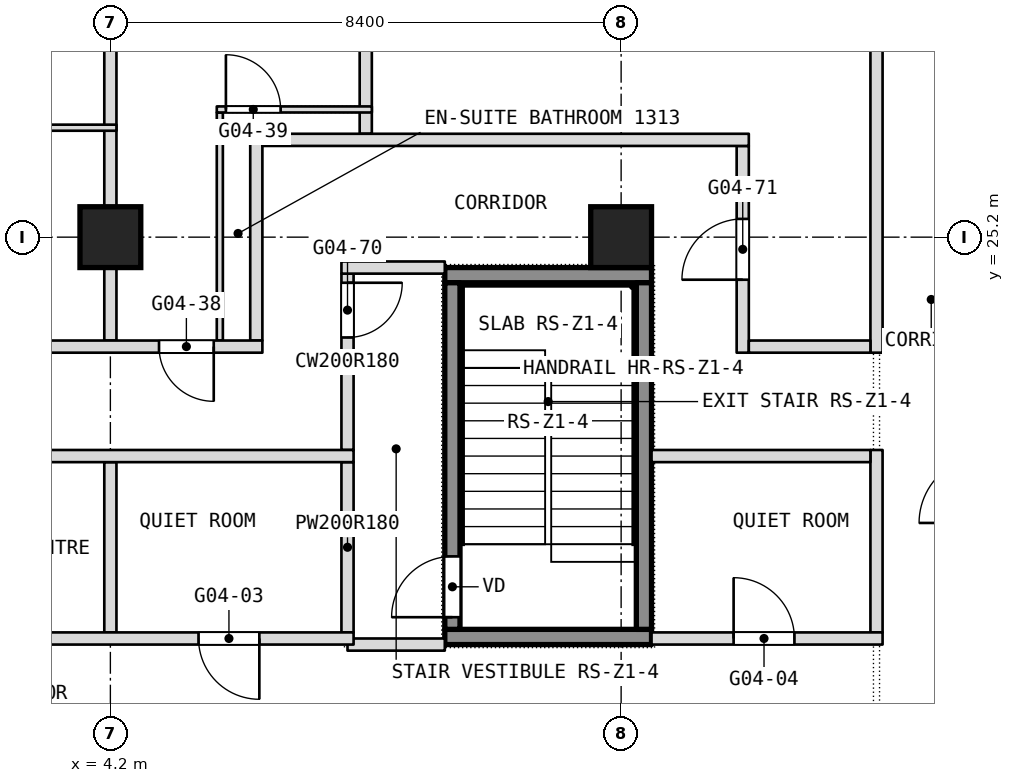
"""IFC4 building model, lengths in metres.
Left out: names, types, materials, properties, quantities, classifications, styles, units other than length and angle.
Written with IfcOpenShell. Run it as: python <this file> out.ifc"""

import sys

from ifc_helpers import new_model, si_unit, direction, frame, frame_2d, origin, origin_2d, place, context, subcontext, project, spatial, rectangle, extrude, element, fill, save


model = new_model("IFC4")
c1 = context("Model", 3, precision=1e-05, world=origin(), true_north=direction((0.0, 1.0)))
c2 = subcontext(c1, "Body", "Model", "MODEL_VIEW")
j1 = project(units=[si_unit("LENGTHUNIT", "METRE"), si_unit("PLANEANGLEUNIT", "RADIAN")], contexts=[c1])
p1 = place(None, origin())
s1 = spatial("IfcSite", under=j1, at=p1, CompositionType="ELEMENT")
p2 = place(p1, origin())
s2 = spatial("IfcBuilding", under=s1, at=p2, CompositionType="ELEMENT")
p3 = place(p2, frame((0.0, 0.0, 61.7)))
s3 = spatial("IfcBuildingStorey", under=s2, at=p3, CompositionType="ELEMENT", Elevation=61.7)
for number, where, z_axis, x_axis in (
    (1, (4.2, 25.2, 0.0), (0.0, 0.0, 1.0), (1.0, 0.0, 0.0)),
    (2, (12.6, 25.2, 0.0), (0.0, 0.0, 1.0), (1.0, 0.0, 0.0)),
):
    element("IfcColumn", number, at=place(p3, frame(where, z_axis=z_axis, x_axis=x_axis)), inside=s3, PredefinedType="COLUMN", context=c2, shape_type="SweptSolid", body=[
        extrude(rectangle(XDim=1.0, YDim=1.0, at=origin_2d()), origin(), (0.0, 0.0, 1.0), 3.6),
    ])
p4 = place(p3, frame((16.8, 18.7, 0.0), z_axis=(0.0, 0.0, 1.0), x_axis=(0.0, 1.0, 0.0)))
e3 = element("IfcWall", 3, at=p4, inside=s3, PredefinedType="PARTITIONING", context=c2, shape_type="SweptSolid", body=[
    extrude(rectangle(XDim=3.0, YDim=0.2, at=frame_2d((1.5, 0.0))), origin(), (0.0, 0.0, 1.0), 3.34),
])
p5 = place(p3, frame((16.8, 23.3, 0.0), z_axis=(0.0, 0.0, 1.0), x_axis=(0.0, 1.0, 0.0)))
e4 = element("IfcWall", 4, at=p5, inside=s3, PredefinedType="PARTITIONING", context=c2, shape_type="SweptSolid", body=[
    extrude(rectangle(XDim=10.24, YDim=0.2, at=frame_2d((5.12, 0.0))), origin(), (0.0, 0.0, 1.0), 3.34),
])
p6 = place(p3, frame((14.6, 23.3, 0.0), z_axis=(0.0, 0.0, 1.0), x_axis=(0.0, 1.0, 0.0)))
e5 = element("IfcWall", 5, at=p6, inside=s3, PredefinedType="PARTITIONING", context=c2, shape_type="SweptSolid", body=[
    extrude(rectangle(XDim=3.4, YDim=0.2, at=frame_2d((1.7, 0.0))), origin(), (0.0, 0.0, 1.0), 3.34),
])
p7 = place(p6, frame((1.2, 0.0, 0.0)))
e6 = element("IfcOpeningElement", 6, at=p7, cuts=e5, PredefinedType="OPENING", context=c2, shape_type="SweptSolid", body=[
    extrude(rectangle(XDim=1.0, YDim=2.1, at=frame_2d((0.5, 1.05))), frame((0.0, 0.1, 0.0), z_axis=(0.0, -1.0, 0.0), x_axis=(1.0, 0.0, 0.0)), (0.0, 0.0, 1.0), 0.2),
])
p8 = place(p3, frame((8.4, 26.9, 0.0), z_axis=(0.0, 0.0, 1.0), x_axis=(0.0, 1.0, 0.0)))
e7 = element("IfcWall", 7, at=p8, inside=s3, PredefinedType="PARTITIONING", context=c2, shape_type="SweptSolid", body=[
    extrude(rectangle(XDim=6.64, YDim=0.2, at=frame_2d((3.32, 0.0))), origin(), (0.0, 0.0, 1.0), 3.34),
])
p9 = place(p3, frame((8.1, 18.7, 0.0), z_axis=(0.0, 0.0, 1.0), x_axis=(0.0, 1.0, 0.0)))
e8 = element("IfcWall", 8, at=p9, inside=s3, PredefinedType="PARTITIONING", context=c2, shape_type="SweptSolid", body=[
    extrude(rectangle(XDim=2.8, YDim=0.2, at=frame_2d((1.4, 0.0))), origin(), (0.0, 0.0, 1.0), 3.34),
])
p10 = place(p3, frame((8.1, 21.7, 0.0), z_axis=(0.0, 0.0, 1.0), x_axis=(0.0, 1.0, 0.0)))
e9 = element("IfcWall", 9, at=p10, inside=s3, PredefinedType="PARTITIONING", context=c2, shape_type="SweptSolid", body=[
    extrude(rectangle(XDim=2.9, YDim=0.2, at=frame_2d((1.45, 0.0))), origin(), (0.0, 0.0, 1.0), 3.34),
])
p11 = place(p10, frame((1.85, 0.0, 0.0)))
e10 = element("IfcOpeningElement", 10, at=p11, cuts=e9, PredefinedType="OPENING", context=c2, shape_type="SweptSolid", body=[
    extrude(rectangle(XDim=0.9, YDim=2.1, at=frame_2d((0.45, 1.05))), frame((0.0, 0.1, 0.0), z_axis=(0.0, -1.0, 0.0), x_axis=(1.0, 0.0, 0.0)), (0.0, 0.0, 1.0), 0.2),
])
p12 = place(p3, frame((6.6, 23.5, 0.0), z_axis=(0.0, 0.0, 1.0), x_axis=(0.0, 1.0, 0.0)))
e11 = element("IfcWall", 11, at=p12, inside=s3, PredefinedType="PARTITIONING", context=c2, shape_type="SweptSolid", body=[
    extrude(rectangle(XDim=3.4, YDim=0.2, at=frame_2d((1.7, 0.0))), origin(), (0.0, 0.0, 1.0), 3.34),
])
p13 = place(p3, frame((6.0, 23.5, 0.0), z_axis=(0.0, 0.0, 1.0), x_axis=(0.0, 1.0, 0.0)))
e12 = element("IfcWall", 12, at=p13, inside=s3, PredefinedType="PARTITIONING", context=c2, shape_type="SweptSolid", body=[
    extrude(rectangle(XDim=3.75, YDim=0.1, at=frame_2d((1.875, 0.0))), origin(), (0.0, 0.0, 1.0), 3.34),
])
p14 = place(p3, frame((4.2, 18.7, 0.0), z_axis=(0.0, 0.0, 1.0), x_axis=(0.0, 1.0, 0.0)))
e13 = element("IfcWall", 13, at=p14, inside=s3, PredefinedType="PARTITIONING", context=c2, shape_type="SweptSolid", body=[
    extrude(rectangle(XDim=2.8, YDim=0.2, at=frame_2d((1.4, 0.0))), origin(), (0.0, 0.0, 1.0), 3.34),
])
p15 = place(p3, frame((4.2, 23.5, 0.0), z_axis=(0.0, 0.0, 1.0), x_axis=(0.0, 1.0, 0.0)))
e14 = element("IfcWall", 14, at=p15, inside=s3, PredefinedType="PARTITIONING", context=c2, shape_type="SweptSolid", body=[
    extrude(rectangle(XDim=10.04, YDim=0.2, at=frame_2d((5.02, 0.0))), origin(), (0.0, 0.0, 1.0), 3.34),
])
p16 = place(p3, frame((8.1, 18.5, 0.0), z_axis=(0.0, 0.0, 1.0), x_axis=(1.0, 0.0, 0.0)))
e15 = element("IfcWall", 15, at=p16, inside=s3, PredefinedType="PARTITIONING", context=c2, shape_type="SweptSolid", body=[
    extrude(rectangle(XDim=1.6, YDim=0.2, at=frame_2d((0.8, 0.0))), origin(), (0.0, 0.0, 1.0), 3.34),
])
p17 = place(p3, frame((-16.9, 18.6, 0.0), z_axis=(0.0, 0.0, 1.0), x_axis=(1.0, 0.0, 0.0)))
e16 = element("IfcWall", 16, at=p17, inside=s3, PredefinedType="PARTITIONING", context=c2, shape_type="SweptSolid", body=[
    extrude(rectangle(XDim=25.1, YDim=0.2, at=frame_2d((12.55, 0.0))), origin(), (0.0, 0.0, 1.0), 3.34),
])
p18 = place(p17, frame((1.7, 0.0, 0.0)))
e17 = element("IfcOpeningElement", 17, at=p18, cuts=e16, PredefinedType="OPENING", context=c2, shape_type="SweptSolid", body=[
    extrude(rectangle(XDim=1.0, YDim=2.1, at=frame_2d((0.5, 1.05))), frame((0.0, 0.1, 0.0), z_axis=(0.0, -1.0, 0.0), x_axis=(1.0, 0.0, 0.0)), (0.0, 0.0, 1.0), 0.2),
])
p19 = place(p17, frame((16.0, 0.0, 0.0)))
e18 = element("IfcOpeningElement", 18, at=p19, cuts=e16, PredefinedType="OPENING", context=c2, shape_type="SweptSolid", body=[
    extrude(rectangle(XDim=1.8, YDim=2.1, at=frame_2d((0.9, 1.05))), frame((0.0, 0.1, 0.0), z_axis=(0.0, -1.0, 0.0), x_axis=(1.0, 0.0, 0.0)), (0.0, 0.0, 1.0), 0.2),
])
p20 = place(p17, frame((22.55, 0.0, 0.0)))
e19 = element("IfcOpeningElement", 19, at=p20, cuts=e16, PredefinedType="OPENING", context=c2, shape_type="SweptSolid", body=[
    extrude(rectangle(XDim=1.0, YDim=2.1, at=frame_2d((0.5, 1.05))), frame((0.0, 0.1, 0.0), z_axis=(0.0, -1.0, 0.0), x_axis=(1.0, 0.0, 0.0)), (0.0, 0.0, 1.0), 0.2),
])
p21 = place(p17, frame((5.9, 0.0, 0.0)))
e20 = element("IfcOpeningElement", 20, at=p21, cuts=e16, PredefinedType="OPENING", context=c2, shape_type="SweptSolid", body=[
    extrude(rectangle(XDim=1.0, YDim=2.1, at=frame_2d((0.5, 1.05))), frame((0.0, 0.1, 0.0), z_axis=(0.0, -1.0, 0.0), x_axis=(1.0, 0.0, 0.0)), (0.0, 0.0, 1.0), 0.2),
])
p22 = place(p17, frame((10.1, 0.0, 0.0)))
e21 = element("IfcOpeningElement", 21, at=p22, cuts=e16, PredefinedType="OPENING", context=c2, shape_type="SweptSolid", body=[
    extrude(rectangle(XDim=1.0, YDim=2.1, at=frame_2d((0.5, 1.05))), frame((0.0, 0.1, 0.0), z_axis=(0.0, -1.0, 0.0), x_axis=(1.0, 0.0, 0.0)), (0.0, 0.0, 1.0), 0.2),
])
p23 = place(p3, frame((13.1, 18.6, 0.0), z_axis=(0.0, 0.0, 1.0), x_axis=(1.0, 0.0, 0.0)))
e22 = element("IfcWall", 22, at=p23, inside=s3, PredefinedType="PARTITIONING", context=c2, shape_type="SweptSolid", body=[
    extrude(rectangle(XDim=3.8, YDim=0.2, at=frame_2d((1.9, 0.0))), origin(), (0.0, 0.0, 1.0), 3.34),
])
p24 = place(p23, frame((1.35, 0.0, 0.0)))
e23 = element("IfcOpeningElement", 23, at=p24, cuts=e22, PredefinedType="OPENING", context=c2, shape_type="SweptSolid", body=[
    extrude(rectangle(XDim=1.0, YDim=2.1, at=frame_2d((0.5, 1.05))), frame((0.0, 0.1, 0.0), z_axis=(0.0, -1.0, 0.0), x_axis=(1.0, 0.0, 0.0)), (0.0, 0.0, 1.0), 0.2),
])
p25 = place(p3, frame((-16.7, 21.6, 0.0), z_axis=(0.0, 0.0, 1.0), x_axis=(1.0, 0.0, 0.0)))
e24 = element("IfcWall", 24, at=p25, inside=s3, PredefinedType="PARTITIONING", context=c2, shape_type="SweptSolid", body=[
    extrude(rectangle(XDim=24.9, YDim=0.2, at=frame_2d((12.45, 0.0))), origin(), (0.0, 0.0, 1.0), 3.34),
])
p26 = place(p3, frame((13.1, 21.6, 0.0), z_axis=(0.0, 0.0, 1.0), x_axis=(1.0, 0.0, 0.0)))
e25 = element("IfcWall", 25, at=p26, inside=s3, PredefinedType="PARTITIONING", context=c2, shape_type="SweptSolid", body=[
    extrude(rectangle(XDim=3.6, YDim=0.2, at=frame_2d((1.8, 0.0))), origin(), (0.0, 0.0, 1.0), 3.34),
])
p27 = place(p3, frame((-16.7, 23.4, 0.0), z_axis=(0.0, 0.0, 1.0), x_axis=(1.0, 0.0, 0.0)))
e26 = element("IfcWall", 26, at=p27, inside=s3, PredefinedType="PARTITIONING", context=c2, shape_type="SweptSolid", body=[
    extrude(rectangle(XDim=23.4, YDim=0.2, at=frame_2d((11.7, 0.0))), origin(), (0.0, 0.0, 1.0), 3.34),
])
p28 = place(p27, frame((2.4, 0.0, 0.0)))
e27 = element("IfcOpeningElement", 27, at=p28, cuts=e26, PredefinedType="OPENING", context=c2, shape_type="SweptSolid", body=[
    extrude(rectangle(XDim=0.9, YDim=2.1, at=frame_2d((0.45, 1.05))), frame((0.0, 0.1, 0.0), z_axis=(0.0, -1.0, 0.0), x_axis=(1.0, 0.0, 0.0)), (0.0, 0.0, 1.0), 0.2),
])
p29 = place(p27, frame((4.9, 0.0, 0.0)))
e28 = element("IfcOpeningElement", 28, at=p29, cuts=e26, PredefinedType="OPENING", context=c2, shape_type="SweptSolid", body=[
    extrude(rectangle(XDim=0.9, YDim=2.1, at=frame_2d((0.45, 1.05))), frame((0.0, 0.1, 0.0), z_axis=(0.0, -1.0, 0.0), x_axis=(1.0, 0.0, 0.0)), (0.0, 0.0, 1.0), 0.2),
])
p30 = place(p27, frame((10.8, 0.0, 0.0)))
e29 = element("IfcOpeningElement", 29, at=p30, cuts=e26, PredefinedType="OPENING", context=c2, shape_type="SweptSolid", body=[
    extrude(rectangle(XDim=0.9, YDim=2.1, at=frame_2d((0.45, 1.05))), frame((0.0, 0.1, 0.0), z_axis=(0.0, -1.0, 0.0), x_axis=(1.0, 0.0, 0.0)), (0.0, 0.0, 1.0), 0.2),
])
p31 = place(p27, frame((16.2, 0.0, 0.0)))
e30 = element("IfcOpeningElement", 30, at=p31, cuts=e26, PredefinedType="OPENING", context=c2, shape_type="SweptSolid", body=[
    extrude(rectangle(XDim=1.1, YDim=2.1, at=frame_2d((0.55, 1.05))), frame((0.0, 0.1, 0.0), z_axis=(0.0, -1.0, 0.0), x_axis=(1.0, 0.0, 0.0)), (0.0, 0.0, 1.0), 0.2),
])
p32 = place(p27, frame((21.7, 0.0, 0.0)))
e31 = element("IfcOpeningElement", 31, at=p32, cuts=e26, PredefinedType="OPENING", context=c2, shape_type="SweptSolid", body=[
    extrude(rectangle(XDim=0.9, YDim=2.1, at=frame_2d((0.45, 1.05))), frame((0.0, 0.1, 0.0), z_axis=(0.0, -1.0, 0.0), x_axis=(1.0, 0.0, 0.0)), (0.0, 0.0, 1.0), 0.2),
])
p33 = place(p3, frame((14.7, 23.4, 0.0), z_axis=(0.0, 0.0, 1.0), x_axis=(1.0, 0.0, 0.0)))
e32 = element("IfcWall", 32, at=p33, inside=s3, PredefinedType="PARTITIONING", context=c2, shape_type="SweptSolid", body=[
    extrude(rectangle(XDim=2.0, YDim=0.2, at=frame_2d((1.0, 0.0))), origin(), (0.0, 0.0, 1.0), 3.34),
])
p34 = place(p3, frame((8.0, 24.7, 0.0), z_axis=(0.0, 0.0, 1.0), x_axis=(1.0, 0.0, 0.0)))
e33 = element("IfcWall", 33, at=p34, inside=s3, PredefinedType="PARTITIONING", context=c2, shape_type="SweptSolid", body=[
    extrude(rectangle(XDim=1.7, YDim=0.2, at=frame_2d((0.85, 0.0))), origin(), (0.0, 0.0, 1.0), 3.34),
])
p35 = place(p3, frame((6.7, 26.8, 0.0), z_axis=(0.0, 0.0, 1.0), x_axis=(1.0, 0.0, 0.0)))
e34 = element("IfcWall", 34, at=p35, inside=s3, PredefinedType="PARTITIONING", context=c2, shape_type="SweptSolid", body=[
    extrude(rectangle(XDim=8.0, YDim=0.2, at=frame_2d((4.0, 0.0))), origin(), (0.0, 0.0, 1.0), 3.34),
])
p36 = place(p3, frame((1.75, 27.0, 0.0), z_axis=(0.0, 0.0, 1.0), x_axis=(1.0, 0.0, 0.0)))
e35 = element("IfcWall", 35, at=p36, inside=s3, PredefinedType="PARTITIONING", context=c2, shape_type="SweptSolid", body=[
    extrude(rectangle(XDim=2.55, YDim=0.1, at=frame_2d((1.275, 0.0))), origin(), (0.0, 0.0, 1.0), 3.34),
])
p37 = place(p36, frame((0.15, 0.0, 0.0)))
e36 = element("IfcOpeningElement", 36, at=p37, cuts=e35, PredefinedType="OPENING", context=c2, shape_type="SweptSolid", body=[
    extrude(rectangle(XDim=0.9, YDim=2.1, at=frame_2d((0.45, 1.05))), frame((0.0, 0.05, 0.0), z_axis=(0.0, -1.0, 0.0), x_axis=(1.0, 0.0, 0.0)), (0.0, 0.0, 1.0), 0.1),
])
p38 = place(p3, frame((5.95, 27.3, 0.0), z_axis=(0.0, 0.0, 1.0), x_axis=(1.0, 0.0, 0.0)))
e37 = element("IfcWall", 37, at=p38, inside=s3, PredefinedType="PARTITIONING", context=c2, shape_type="SweptSolid", body=[
    extrude(rectangle(XDim=2.55, YDim=0.1, at=frame_2d((1.275, 0.0))), origin(), (0.0, 0.0, 1.0), 3.34),
])
p39 = place(p38, frame((0.15, 0.0, 0.0)))
e38 = element("IfcOpeningElement", 38, at=p39, cuts=e37, PredefinedType="OPENING", context=c2, shape_type="SweptSolid", body=[
    extrude(rectangle(XDim=0.9, YDim=2.1, at=frame_2d((0.45, 1.05))), frame((0.0, 0.05, 0.0), z_axis=(0.0, -1.0, 0.0), x_axis=(1.0, 0.0, 0.0)), (0.0, 0.0, 1.0), 0.1),
])
for number, where, z_axis, x_axis in (
    (39, (9.7, 18.625, 0.1), (0.0, 0.0, 1.0), (1.0, 0.0, 0.0)),
    (40, (9.7, 24.575, 0.1), (0.0, 0.0, 1.0), (1.0, 0.0, 0.0)),
):
    element("IfcWall", number, at=place(p3, frame(where, z_axis=z_axis, x_axis=x_axis)), inside=s3, PredefinedType="SHEAR", context=c2, shape_type="SweptSolid", body=[
        extrude(rectangle(XDim=3.4, YDim=0.25, at=frame_2d((1.7, 0.0))), origin(), (0.0, 0.0, 1.0), 3.6),
    ])
p40 = place(p3, frame((9.825, 18.75, 0.1), z_axis=(0.0, 0.0, 1.0), x_axis=(0.0, 1.0, 0.0)))
e41 = element("IfcWall", 41, at=p40, inside=s3, PredefinedType="SHEAR", context=c2, shape_type="SweptSolid", body=[
    extrude(rectangle(XDim=5.7, YDim=0.25, at=frame_2d((2.85, 0.0))), origin(), (0.0, 0.0, 1.0), 3.6),
])
p41 = place(p40, frame((0.2, 0.0, 0.0)))
e42 = element("IfcOpeningElement", 42, at=p41, cuts=e41, PredefinedType="OPENING", context=c2, shape_type="SweptSolid", body=[
    extrude(rectangle(XDim=1.0, YDim=2.1, at=frame_2d((0.5, 1.05))), frame((0.0, 0.125, 0.0), z_axis=(0.0, -1.0, 0.0), x_axis=(1.0, 0.0, 0.0)), (0.0, 0.0, 1.0), 0.25),
])
p42 = place(p3, frame((12.975, 18.75, 0.1), z_axis=(0.0, 0.0, 1.0), x_axis=(0.0, 1.0, 0.0)))
e43 = element("IfcWall", 43, at=p42, inside=s3, PredefinedType="SHEAR", context=c2, shape_type="SweptSolid", body=[
    extrude(rectangle(XDim=5.7, YDim=0.25, at=frame_2d((2.85, 0.0))), origin(), (0.0, 0.0, 1.0), 3.6),
])
p43 = place(p7, origin())
e44 = element("IfcDoor", 44, at=p43, inside=s3, OperationType="SINGLE_SWING_LEFT", PredefinedType="DOOR", context=c2, shape_type="SweptSolid", body=[
    extrude(rectangle(XDim=1.0, YDim=2.1, at=frame_2d((0.5, 1.05))), frame((0.0, 0.025, 0.0), z_axis=(0.0, -1.0, 0.0), x_axis=(1.0, 0.0, 0.0)), (0.0, 0.0, 1.0), 0.05),
])
fill(e6, e44)
p44 = place(p11, origin())
e45 = element("IfcDoor", 45, at=p44, inside=s3, OperationType="SINGLE_SWING_LEFT", PredefinedType="DOOR", context=c2, shape_type="SweptSolid", body=[
    extrude(rectangle(XDim=0.9, YDim=2.1, at=frame_2d((0.45, 1.05))), frame((0.0, 0.025, 0.0), z_axis=(0.0, -1.0, 0.0), x_axis=(1.0, 0.0, 0.0)), (0.0, 0.0, 1.0), 0.05),
])
fill(e10, e45)
p45 = place(p20, origin())
e46 = element("IfcDoor", 46, at=p45, inside=s3, OperationType="SINGLE_SWING_LEFT", PredefinedType="DOOR", context=c2, shape_type="SweptSolid", body=[
    extrude(rectangle(XDim=1.0, YDim=2.1, at=frame_2d((0.5, 1.05))), frame((0.0, 0.025, 0.0), z_axis=(0.0, -1.0, 0.0), x_axis=(1.0, 0.0, 0.0)), (0.0, 0.0, 1.0), 0.05),
])
fill(e19, e46)
p46 = place(p24, origin())
e47 = element("IfcDoor", 47, at=p46, inside=s3, OperationType="SINGLE_SWING_LEFT", PredefinedType="DOOR", context=c2, shape_type="SweptSolid", body=[
    extrude(rectangle(XDim=1.0, YDim=2.1, at=frame_2d((0.5, 1.05))), frame((0.0, 0.025, 0.0), z_axis=(0.0, -1.0, 0.0), x_axis=(1.0, 0.0, 0.0)), (0.0, 0.0, 1.0), 0.05),
])
fill(e23, e47)
p47 = place(p32, origin())
e48 = element("IfcDoor", 48, at=p47, inside=s3, OperationType="SINGLE_SWING_RIGHT", PredefinedType="DOOR", context=c2, shape_type="SweptSolid", body=[
    extrude(rectangle(XDim=0.9, YDim=2.1, at=frame_2d((0.45, 1.05))), frame((0.0, 0.025, 0.0), z_axis=(0.0, -1.0, 0.0), x_axis=(1.0, 0.0, 0.0)), (0.0, 0.0, 1.0), 0.05),
])
fill(e31, e48)
p48 = place(p39, origin())
e49 = element("IfcDoor", 49, at=p48, inside=s3, OperationType="SINGLE_SWING_RIGHT", PredefinedType="DOOR", context=c2, shape_type="SweptSolid", body=[
    extrude(rectangle(XDim=0.9, YDim=2.1, at=frame_2d((0.45, 1.05))), frame((0.0, 0.025, 0.0), z_axis=(0.0, -1.0, 0.0), x_axis=(1.0, 0.0, 0.0)), (0.0, 0.0, 1.0), 0.05),
])
fill(e38, e49)
p49 = place(p41, origin())
e50 = element("IfcDoor", 50, at=p49, inside=s3, OperationType="SINGLE_SWING_LEFT", PredefinedType="DOOR", context=c2, shape_type="SweptSolid", body=[
    extrude(rectangle(XDim=1.0, YDim=2.1, at=frame_2d((0.5, 1.05))), frame((0.0, 0.025, 0.0), z_axis=(0.0, -1.0, 0.0), x_axis=(1.0, 0.0, 0.0)), (0.0, 0.0, 1.0), 0.05),
])
fill(e42, e50)
save(model, sys.argv[1])
